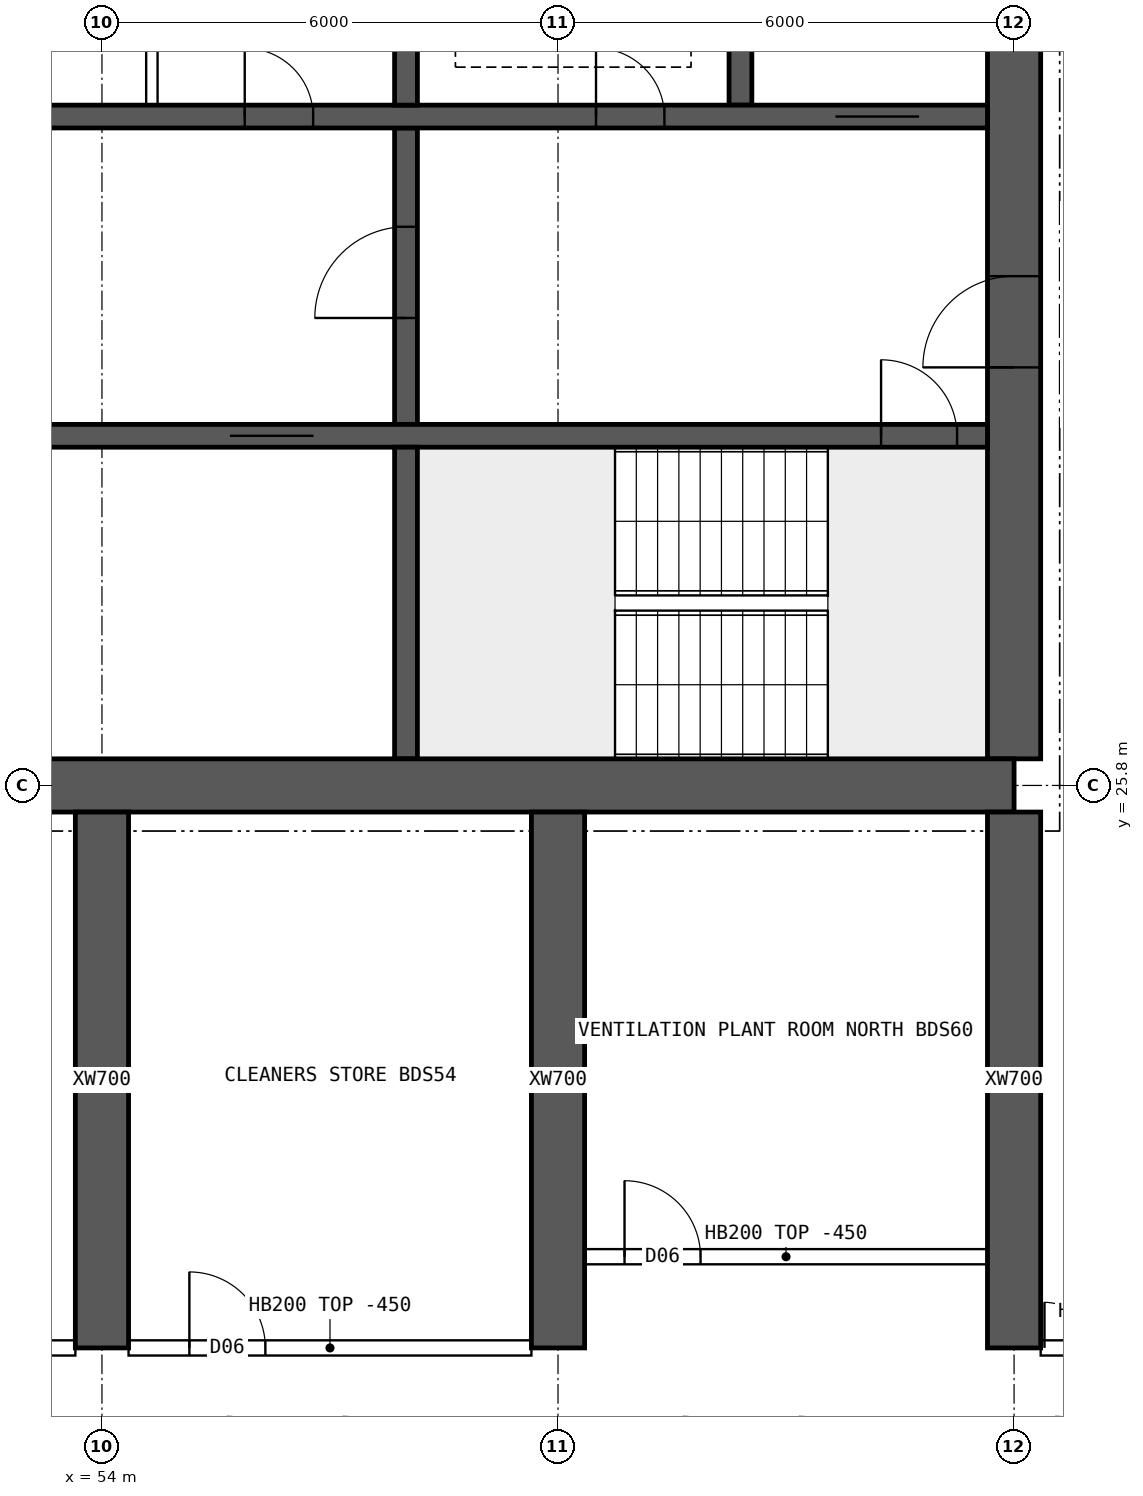
"""IFC4 building model, lengths in metres.
Left out: names, types, materials, properties, quantities, classifications, styles, units other than length and angle.
Written with IfcOpenShell. Run it as: python <this file> out.ifc"""

import sys

from ifc_helpers import new_model, si_unit, direction, frame, frame_2d, origin, place, context, subcontext, project, spatial, rectangle, extrude, element, fill, save


model = new_model("IFC4")
c1 = context("Model", 3, precision=1e-05, world=origin(), true_north=direction((0.0, 1.0)))
c2 = subcontext(c1, "Body", "Model", "MODEL_VIEW")
j1 = project(units=[si_unit("LENGTHUNIT", "METRE"), si_unit("PLANEANGLEUNIT", "RADIAN")], contexts=[c1])
p1 = place(None, origin())
s1 = spatial("IfcSite", under=j1, at=p1, CompositionType="ELEMENT")
p2 = place(p1, origin())
s2 = spatial("IfcBuilding", under=s1, at=p2, CompositionType="ELEMENT")
p3 = place(p2, frame((0.0, 0.0, 242.8)))
s3 = spatial("IfcBuildingStorey", under=s2, at=p3, CompositionType="ELEMENT", Elevation=242.8)
p4 = place(p3, frame((18.0, 25.8, 0.0), z_axis=(0.0, 0.0, 1.0), x_axis=(1.0, 0.0, 0.0)))
e1 = element("IfcWall", 1, at=p4, inside=s3, PredefinedType="SHEAR", context=c2, shape_type="SweptSolid", body=[
    extrude(rectangle(XDim=48.0, YDim=0.7, at=frame_2d((24.0, 0.0))), origin(), (0.0, 0.0, 1.0), 3.75),
])
p5 = place(p3, frame((66.0, 26.15, 0.0), z_axis=(0.0, 0.0, 1.0), x_axis=(0.0, 1.0, 0.0)))
e2 = element("IfcWall", 2, at=p5, inside=s3, PredefinedType="SHEAR", context=c2, shape_type="SweptSolid", body=[
    extrude(rectangle(XDim=11.7, YDim=0.7, at=frame_2d((5.85, 0.0))), origin(), (0.0, 0.0, 1.0), 3.75),
])
p6 = place(p5, frame((5.15, 0.0, 0.0)))
e3 = element("IfcOpeningElement", 3, at=p6, cuts=e2, PredefinedType="OPENING", context=c2, shape_type="SweptSolid", body=[
    extrude(rectangle(XDim=1.2, YDim=2.1, at=frame_2d((0.6, 1.05))), frame((0.0, 0.36, 0.0), z_axis=(0.0, -1.0, 0.0), x_axis=(1.0, 0.0, 0.0)), (0.0, 0.0, 1.0), 0.72),
])
p7 = place(p3, frame((18.35, 30.4, 0.0), z_axis=(0.0, 0.0, 1.0), x_axis=(1.0, 0.0, 0.0)))
e4 = element("IfcWall", 4, at=p7, inside=s3, PredefinedType="SHEAR", context=c2, shape_type="SweptSolid", body=[
    extrude(rectangle(XDim=47.3, YDim=0.3, at=frame_2d((23.65, 0.0))), origin(), (0.0, 0.0, 1.0), 3.75),
])
p8 = place(p7, frame((0.4, 0.0, 0.0)))
e5 = element("IfcOpeningElement", 5, at=p8, cuts=e4, PredefinedType="OPENING", context=c2, shape_type="SweptSolid", body=[
    extrude(rectangle(XDim=1.0, YDim=2.1, at=frame_2d((0.5, 1.05))), frame((0.0, 0.16, 0.0), z_axis=(0.0, -1.0, 0.0), x_axis=(1.0, 0.0, 0.0)), (0.0, 0.0, 1.0), 0.32),
])
p9 = place(p7, frame((45.9, 0.0, 0.0)))
e6 = element("IfcOpeningElement", 6, at=p9, cuts=e4, PredefinedType="OPENING", context=c2, shape_type="SweptSolid", body=[
    extrude(rectangle(XDim=1.0, YDim=2.1, at=frame_2d((0.5, 1.05))), frame((0.0, 0.16, 0.0), z_axis=(0.0, -1.0, 0.0), x_axis=(1.0, 0.0, 0.0)), (0.0, 0.0, 1.0), 0.32),
])
p10 = place(p7, frame((8.4, 0.0, 0.0)))
e7 = element("IfcOpeningElement", 7, at=p10, cuts=e4, PredefinedType="OPENING", context=c2, shape_type="SweptSolid", body=[
    extrude(rectangle(XDim=1.1, YDim=2.1, at=frame_2d((0.55, 1.05))), frame((0.0, 0.16, 0.0), z_axis=(0.0, -1.0, 0.0), x_axis=(1.0, 0.0, 0.0)), (0.0, 0.0, 1.0), 0.32),
])
p11 = place(p7, frame((11.0, 0.0, 0.0)))
e8 = element("IfcOpeningElement", 8, at=p11, cuts=e4, PredefinedType="OPENING", context=c2, shape_type="SweptSolid", body=[
    extrude(rectangle(XDim=1.1, YDim=2.1, at=frame_2d((0.55, 1.05))), frame((0.0, 0.16, 0.0), z_axis=(0.0, -1.0, 0.0), x_axis=(1.0, 0.0, 0.0)), (0.0, 0.0, 1.0), 0.32),
])
p12 = place(p7, frame((13.6, 0.0, 0.0)))
e9 = element("IfcOpeningElement", 9, at=p12, cuts=e4, PredefinedType="OPENING", context=c2, shape_type="SweptSolid", body=[
    extrude(rectangle(XDim=1.1, YDim=2.1, at=frame_2d((0.55, 1.05))), frame((0.0, 0.16, 0.0), z_axis=(0.0, -1.0, 0.0), x_axis=(1.0, 0.0, 0.0)), (0.0, 0.0, 1.0), 0.32),
])
p13 = place(p7, frame((16.2, 0.0, 0.0)))
e10 = element("IfcOpeningElement", 10, at=p13, cuts=e4, PredefinedType="OPENING", context=c2, shape_type="SweptSolid", body=[
    extrude(rectangle(XDim=1.1, YDim=2.1, at=frame_2d((0.55, 1.05))), frame((0.0, 0.16, 0.0), z_axis=(0.0, -1.0, 0.0), x_axis=(1.0, 0.0, 0.0)), (0.0, 0.0, 1.0), 0.32),
])
p14 = place(p7, frame((18.975, 0.0, 0.0)))
e11 = element("IfcOpeningElement", 11, at=p14, cuts=e4, PredefinedType="OPENING", context=c2, shape_type="SweptSolid", body=[
    extrude(rectangle(XDim=0.9, YDim=2.1, at=frame_2d((0.45, 1.05))), frame((0.0, 0.16, 0.0), z_axis=(0.0, -1.0, 0.0), x_axis=(1.0, 0.0, 0.0)), (0.0, 0.0, 1.0), 0.32),
])
p15 = place(p7, frame((24.475, 0.0, 0.0)))
e12 = element("IfcOpeningElement", 12, at=p15, cuts=e4, PredefinedType="OPENING", context=c2, shape_type="SweptSolid", body=[
    extrude(rectangle(XDim=0.9, YDim=2.1, at=frame_2d((0.45, 1.05))), frame((0.0, 0.16, 0.0), z_axis=(0.0, -1.0, 0.0), x_axis=(1.0, 0.0, 0.0)), (0.0, 0.0, 1.0), 0.32),
])
p16 = place(p7, frame((30.267, 0.0, 0.0)))
e13 = element("IfcOpeningElement", 13, at=p16, cuts=e4, PredefinedType="OPENING", context=c2, shape_type="SweptSolid", body=[
    extrude(rectangle(XDim=1.1, YDim=2.1, at=frame_2d((0.55, 1.05))), frame((0.0, 0.16, 0.0), z_axis=(0.0, -1.0, 0.0), x_axis=(1.0, 0.0, 0.0)), (0.0, 0.0, 1.0), 0.32),
])
p17 = place(p7, frame((33.8, 0.0, 0.0)))
e14 = element("IfcOpeningElement", 14, at=p17, cuts=e4, PredefinedType="OPENING", context=c2, shape_type="SweptSolid", body=[
    extrude(rectangle(XDim=1.1, YDim=2.1, at=frame_2d((0.55, 1.05))), frame((0.0, 0.16, 0.0), z_axis=(0.0, -1.0, 0.0), x_axis=(1.0, 0.0, 0.0)), (0.0, 0.0, 1.0), 0.32),
])
p18 = place(p7, frame((37.333, 0.0, 0.0)))
e15 = element("IfcOpeningElement", 15, at=p18, cuts=e4, PredefinedType="OPENING", context=c2, shape_type="SweptSolid", body=[
    extrude(rectangle(XDim=1.1, YDim=2.1, at=frame_2d((0.55, 1.05))), frame((0.0, 0.16, 0.0), z_axis=(0.0, -1.0, 0.0), x_axis=(1.0, 0.0, 0.0)), (0.0, 0.0, 1.0), 0.32),
])
p19 = place(p3, frame((18.35, 34.6, 0.0), z_axis=(0.0, 0.0, 1.0), x_axis=(1.0, 0.0, 0.0)))
e16 = element("IfcWall", 16, at=p19, inside=s3, PredefinedType="SHEAR", context=c2, shape_type="SweptSolid", body=[
    extrude(rectangle(XDim=47.3, YDim=0.3, at=frame_2d((23.65, 0.0))), origin(), (0.0, 0.0, 1.0), 3.75),
])
p20 = place(p19, frame((0.9, 0.0, 0.0)))
e17 = element("IfcOpeningElement", 17, at=p20, cuts=e16, PredefinedType="OPENING", context=c2, shape_type="SweptSolid", body=[
    extrude(rectangle(XDim=1.1, YDim=2.1, at=frame_2d((0.55, 1.05))), frame((0.0, 0.16, 0.0), z_axis=(0.0, -1.0, 0.0), x_axis=(1.0, 0.0, 0.0)), (0.0, 0.0, 1.0), 0.32),
])
p21 = place(p19, frame((45.3, 0.0, 0.0)))
e18 = element("IfcOpeningElement", 18, at=p21, cuts=e16, PredefinedType="OPENING", context=c2, shape_type="SweptSolid", body=[
    extrude(rectangle(XDim=1.1, YDim=2.1, at=frame_2d((0.55, 1.05))), frame((0.0, 0.16, 0.0), z_axis=(0.0, -1.0, 0.0), x_axis=(1.0, 0.0, 0.0)), (0.0, 0.0, 1.0), 0.32),
])
p22 = place(p19, frame((4.25, 0.0, 0.0)))
e19 = element("IfcOpeningElement", 19, at=p22, cuts=e16, PredefinedType="OPENING", context=c2, shape_type="SweptSolid", body=[
    extrude(rectangle(XDim=0.9, YDim=2.1, at=frame_2d((0.45, 1.05))), frame((0.0, 0.16, 0.0), z_axis=(0.0, -1.0, 0.0), x_axis=(1.0, 0.0, 0.0)), (0.0, 0.0, 1.0), 0.32),
])
p23 = place(p19, frame((42.15, 0.0, 0.0)))
e20 = element("IfcOpeningElement", 20, at=p23, cuts=e16, PredefinedType="OPENING", context=c2, shape_type="SweptSolid", body=[
    extrude(rectangle(XDim=0.9, YDim=2.1, at=frame_2d((0.45, 1.05))), frame((0.0, 0.16, 0.0), z_axis=(0.0, -1.0, 0.0), x_axis=(1.0, 0.0, 0.0)), (0.0, 0.0, 1.0), 0.32),
])
p24 = place(p19, frame((9.025, 0.0, 0.0)))
e21 = element("IfcOpeningElement", 21, at=p24, cuts=e16, PredefinedType="OPENING", context=c2, shape_type="SweptSolid", body=[
    extrude(rectangle(XDim=0.9, YDim=2.1, at=frame_2d((0.45, 1.05))), frame((0.0, 0.16, 0.0), z_axis=(0.0, -1.0, 0.0), x_axis=(1.0, 0.0, 0.0)), (0.0, 0.0, 1.0), 0.32),
])
p25 = place(p19, frame((12.999, 0.0, 0.0)))
e22 = element("IfcOpeningElement", 22, at=p25, cuts=e16, PredefinedType="OPENING", context=c2, shape_type="SweptSolid", body=[
    extrude(rectangle(XDim=0.9, YDim=2.1, at=frame_2d((0.45, 1.05))), frame((0.0, 0.16, 0.0), z_axis=(0.0, -1.0, 0.0), x_axis=(1.0, 0.0, 0.0)), (0.0, 0.0, 1.0), 0.32),
])
p26 = place(p19, frame((16.646, 0.0, 0.0)))
e23 = element("IfcOpeningElement", 23, at=p26, cuts=e16, PredefinedType="OPENING", context=c2, shape_type="SweptSolid", body=[
    extrude(rectangle(XDim=0.9, YDim=2.1, at=frame_2d((0.45, 1.05))), frame((0.0, 0.16, 0.0), z_axis=(0.0, -1.0, 0.0), x_axis=(1.0, 0.0, 0.0)), (0.0, 0.0, 1.0), 0.32),
])
p27 = place(p19, frame((20.405, 0.0, 0.0)))
e24 = element("IfcOpeningElement", 24, at=p27, cuts=e16, PredefinedType="OPENING", context=c2, shape_type="SweptSolid", body=[
    extrude(rectangle(XDim=0.9, YDim=2.1, at=frame_2d((0.45, 1.05))), frame((0.0, 0.16, 0.0), z_axis=(0.0, -1.0, 0.0), x_axis=(1.0, 0.0, 0.0)), (0.0, 0.0, 1.0), 0.32),
])
p28 = place(p19, frame((24.811, 0.0, 0.0)))
e25 = element("IfcOpeningElement", 25, at=p28, cuts=e16, PredefinedType="OPENING", context=c2, shape_type="SweptSolid", body=[
    extrude(rectangle(XDim=0.9, YDim=2.1, at=frame_2d((0.45, 1.05))), frame((0.0, 0.16, 0.0), z_axis=(0.0, -1.0, 0.0), x_axis=(1.0, 0.0, 0.0)), (0.0, 0.0, 1.0), 0.32),
])
p29 = place(p19, frame((27.608, 0.0, 0.0)))
e26 = element("IfcOpeningElement", 26, at=p29, cuts=e16, PredefinedType="OPENING", context=c2, shape_type="SweptSolid", body=[
    extrude(rectangle(XDim=0.9, YDim=2.1, at=frame_2d((0.45, 1.05))), frame((0.0, 0.16, 0.0), z_axis=(0.0, -1.0, 0.0), x_axis=(1.0, 0.0, 0.0)), (0.0, 0.0, 1.0), 0.32),
])
p30 = place(p19, frame((29.778, 0.0, 0.0)))
e27 = element("IfcOpeningElement", 27, at=p30, cuts=e16, PredefinedType="OPENING", context=c2, shape_type="SweptSolid", body=[
    extrude(rectangle(XDim=0.9, YDim=2.1, at=frame_2d((0.45, 1.05))), frame((0.0, 0.16, 0.0), z_axis=(0.0, -1.0, 0.0), x_axis=(1.0, 0.0, 0.0)), (0.0, 0.0, 1.0), 0.32),
])
p31 = place(p19, frame((33.577, 0.0, 0.0)))
e28 = element("IfcOpeningElement", 28, at=p31, cuts=e16, PredefinedType="OPENING", context=c2, shape_type="SweptSolid", body=[
    extrude(rectangle(XDim=0.9, YDim=2.1, at=frame_2d((0.45, 1.05))), frame((0.0, 0.16, 0.0), z_axis=(0.0, -1.0, 0.0), x_axis=(1.0, 0.0, 0.0)), (0.0, 0.0, 1.0), 0.32),
])
p32 = place(p19, frame((37.528, 0.0, 0.0)))
e29 = element("IfcOpeningElement", 29, at=p32, cuts=e16, PredefinedType="OPENING", context=c2, shape_type="SweptSolid", body=[
    extrude(rectangle(XDim=0.9, YDim=2.1, at=frame_2d((0.45, 1.05))), frame((0.0, 0.16, 0.0), z_axis=(0.0, -1.0, 0.0), x_axis=(1.0, 0.0, 0.0)), (0.0, 0.0, 1.0), 0.32),
])
p33 = place(p3, frame((58.0, 26.15, 0.0), z_axis=(0.0, 0.0, 1.0), x_axis=(0.0, 1.0, 0.0)))
e30 = element("IfcWall", 30, at=p33, inside=s3, PredefinedType="SHEAR", context=c2, shape_type="SweptSolid", body=[
    extrude(rectangle(XDim=4.1, YDim=0.3, at=frame_2d((2.05, 0.0))), origin(), (0.0, 0.0, 1.0), 3.75),
])
p34 = place(p3, frame((58.0, 30.55, 0.0), z_axis=(0.0, 0.0, 1.0), x_axis=(0.0, 1.0, 0.0)))
e31 = element("IfcWall", 31, at=p34, inside=s3, PredefinedType="SHEAR", context=c2, shape_type="SweptSolid", body=[
    extrude(rectangle(XDim=3.9, YDim=0.3, at=frame_2d((1.95, 0.0))), origin(), (0.0, 0.0, 1.0), 3.75),
])
p35 = place(p34, frame((1.4, 0.0, 0.0)))
e32 = element("IfcOpeningElement", 32, at=p35, cuts=e31, PredefinedType="OPENING", context=c2, shape_type="SweptSolid", body=[
    extrude(rectangle(XDim=1.2, YDim=2.1, at=frame_2d((0.6, 1.05))), frame((0.0, 0.16, 0.0), z_axis=(0.0, -1.0, 0.0), x_axis=(1.0, 0.0, 0.0)), (0.0, 0.0, 1.0), 0.32),
])
for number, where, z_axis, x_axis in (
    (33, (62.4, 34.75, 0.0), (0.0, 0.0, 1.0), (0.0, 1.0, 0.0)),
    (34, (58.0, 34.75, 0.0), (0.0, 0.0, 1.0), (0.0, 1.0, 0.0)),
):
    element("IfcWall", number, at=place(p3, frame(where, z_axis=z_axis, x_axis=x_axis)), inside=s3, PredefinedType="SHEAR", context=c2, shape_type="SweptSolid", body=[
        extrude(rectangle(XDim=3.1, YDim=0.3, at=frame_2d((1.55, 0.0))), origin(), (0.0, 0.0, 1.0), 3.75),
    ])
for number, where, z_axis, x_axis in (
    (35, (54.0, 18.4, 0.0), (0.0, 0.0, 1.0), (0.0, 1.0, 0.0)),
    (36, (60.0, 18.4, 0.0), (0.0, 0.0, 1.0), (0.0, 1.0, 0.0)),
    (37, (66.0, 18.4, 0.0), (0.0, 0.0, 1.0), (0.0, 1.0, 0.0)),
):
    element("IfcWall", number, at=place(p3, frame(where, z_axis=z_axis, x_axis=x_axis)), inside=s3, PredefinedType="SHEAR", context=c2, shape_type="SweptSolid", body=[
        extrude(rectangle(XDim=7.05, YDim=0.7, at=frame_2d((3.525, 0.0))), origin(), (0.0, 0.0, 1.0), 3.75),
    ])
p36 = place(p3, frame((54.657, 34.75, 0.0), z_axis=(0.0, 0.0, 1.0), x_axis=(0.0, 1.0, 0.0)))
e38 = element("IfcWall", 38, at=p36, inside=s3, PredefinedType="SOLIDWALL", context=c2, shape_type="SweptSolid", body=[
    extrude(rectangle(XDim=3.1, YDim=0.15, at=frame_2d((1.55, 0.0))), origin(), (0.0, 0.0, 1.0), 3.3),
])
p37 = place(p3, frame((48.35, 18.4, 0.0), z_axis=(0.0, 0.0, 1.0), x_axis=(1.0, 0.0, 0.0)))
e39 = element("IfcWall", 39, at=p37, inside=s3, PredefinedType="SOLIDWALL", context=c2, shape_type="SweptSolid", body=[
    extrude(rectangle(XDim=5.3, YDim=0.2, at=frame_2d((2.65, 0.0))), origin(), (0.0, 0.0, 1.0), 3.3),
])
p38 = place(p37, frame((0.15, 0.0, 0.0)))
e40 = element("IfcOpeningElement", 40, at=p38, cuts=e39, PredefinedType="OPENING", context=c2, shape_type="SweptSolid", body=[
    extrude(rectangle(XDim=0.9, YDim=2.1, at=frame_2d((0.45, 1.05))), frame((0.0, 0.11, 0.0), z_axis=(0.0, -1.0, 0.0), x_axis=(1.0, 0.0, 0.0)), (0.0, 0.0, 1.0), 0.22),
])
p39 = place(p37, frame((2.35, 0.0, 0.0)))
e41 = element("IfcOpeningElement", 41, at=p39, cuts=e39, PredefinedType="OPENING", context=c2, shape_type="SweptSolid", body=[
    extrude(rectangle(XDim=0.9, YDim=2.1, at=frame_2d((0.45, 1.05))), frame((0.0, 0.11, 0.0), z_axis=(0.0, -1.0, 0.0), x_axis=(1.0, 0.0, 0.0)), (0.0, 0.0, 1.0), 0.22),
])
p40 = place(p3, frame((54.35, 18.4, 0.0), z_axis=(0.0, 0.0, 1.0), x_axis=(1.0, 0.0, 0.0)))
e42 = element("IfcWall", 42, at=p40, inside=s3, PredefinedType="SOLIDWALL", context=c2, shape_type="SweptSolid", body=[
    extrude(rectangle(XDim=5.3, YDim=0.2, at=frame_2d((2.65, 0.0))), origin(), (0.0, 0.0, 1.0), 3.3),
])
p41 = place(p40, frame((0.8, 0.0, 0.0)))
e43 = element("IfcOpeningElement", 43, at=p41, cuts=e42, PredefinedType="OPENING", context=c2, shape_type="SweptSolid", body=[
    extrude(rectangle(XDim=1.0, YDim=2.1, at=frame_2d((0.5, 1.05))), frame((0.0, 0.11, 0.0), z_axis=(0.0, -1.0, 0.0), x_axis=(1.0, 0.0, 0.0)), (0.0, 0.0, 1.0), 0.22),
])
p42 = place(p3, frame((66.35, 18.4, 0.0), z_axis=(0.0, 0.0, 1.0), x_axis=(1.0, 0.0, 0.0)))
e44 = element("IfcWall", 44, at=p42, inside=s3, PredefinedType="SOLIDWALL", context=c2, shape_type="SweptSolid", body=[
    extrude(rectangle(XDim=2.05, YDim=0.2, at=frame_2d((1.025, 0.0))), origin(), (0.0, 0.0, 1.0), 3.3),
])
p43 = place(p42, frame((0.05, 0.0, 0.0)))
e45 = element("IfcOpeningElement", 45, at=p43, cuts=e44, PredefinedType="OPENING", context=c2, shape_type="SweptSolid", body=[
    extrude(rectangle(XDim=1.2, YDim=2.1, at=frame_2d((0.6, 1.05))), frame((0.0, 0.11, 0.0), z_axis=(0.0, -1.0, 0.0), x_axis=(1.0, 0.0, 0.0)), (0.0, 0.0, 1.0), 0.22),
])
p44 = place(p3, frame((60.35, 19.6, 0.0), z_axis=(0.0, 0.0, 1.0), x_axis=(1.0, 0.0, 0.0)))
e46 = element("IfcWall", 46, at=p44, inside=s3, PredefinedType="SOLIDWALL", context=c2, shape_type="SweptSolid", body=[
    extrude(rectangle(XDim=5.3, YDim=0.2, at=frame_2d((2.65, 0.0))), origin(), (0.0, 0.0, 1.0), 3.3),
])
p45 = place(p44, frame((0.525, 0.0, 0.0)))
e47 = element("IfcOpeningElement", 47, at=p45, cuts=e46, PredefinedType="OPENING", context=c2, shape_type="SweptSolid", body=[
    extrude(rectangle(XDim=1.0, YDim=2.1, at=frame_2d((0.5, 1.05))), frame((0.0, 0.11, 0.0), z_axis=(0.0, -1.0, 0.0), x_axis=(1.0, 0.0, 0.0)), (0.0, 0.0, 1.0), 0.22),
])
p46 = place(p6, origin())
e48 = element("IfcDoor", 48, at=p46, inside=s3, OperationType="SINGLE_SWING_LEFT", PredefinedType="DOOR", context=c2, shape_type="SweptSolid", body=[
    extrude(rectangle(XDim=1.2, YDim=2.1, at=frame_2d((0.6, 1.05))), frame((0.0, 0.025, 0.0), z_axis=(0.0, -1.0, 0.0), x_axis=(1.0, 0.0, 0.0)), (0.0, 0.0, 1.0), 0.05),
])
fill(e3, e48)
p47 = place(p9, origin())
e49 = element("IfcDoor", 49, at=p47, inside=s3, OperationType="SINGLE_SWING_LEFT", PredefinedType="DOOR", context=c2, shape_type="SweptSolid", body=[
    extrude(rectangle(XDim=1.0, YDim=2.1, at=frame_2d((0.5, 1.05))), frame((0.0, 0.025, 0.0), z_axis=(0.0, -1.0, 0.0), x_axis=(1.0, 0.0, 0.0)), (0.0, 0.0, 1.0), 0.05),
])
fill(e6, e49)
p48 = place(p21, origin())
e50 = element("IfcDoor", 50, at=p48, inside=s3, OperationType="DOUBLE_DOOR_SLIDING", PredefinedType="DOOR", context=c2, shape_type="SweptSolid", body=[
    extrude(rectangle(XDim=1.1, YDim=2.1, at=frame_2d((0.55, 1.05))), frame((0.0, 0.025, 0.0), z_axis=(0.0, -1.0, 0.0), x_axis=(1.0, 0.0, 0.0)), (0.0, 0.0, 1.0), 0.05),
])
fill(e18, e50)
p49 = place(p23, origin())
e51 = element("IfcDoor", 51, at=p49, inside=s3, OperationType="SINGLE_SWING_LEFT", PredefinedType="DOOR", context=c2, shape_type="SweptSolid", body=[
    extrude(rectangle(XDim=0.9, YDim=2.1, at=frame_2d((0.45, 1.05))), frame((0.0, 0.025, 0.0), z_axis=(0.0, -1.0, 0.0), x_axis=(1.0, 0.0, 0.0)), (0.0, 0.0, 1.0), 0.05),
])
fill(e20, e51)
p50 = place(p35, origin())
e52 = element("IfcDoor", 52, at=p50, inside=s3, OperationType="SINGLE_SWING_LEFT", PredefinedType="DOOR", context=c2, shape_type="SweptSolid", body=[
    extrude(rectangle(XDim=1.2, YDim=2.1, at=frame_2d((0.6, 1.05))), frame((0.0, 0.025, 0.0), z_axis=(0.0, -1.0, 0.0), x_axis=(1.0, 0.0, 0.0)), (0.0, 0.0, 1.0), 0.05),
])
fill(e32, e52)
p51 = place(p32, origin())
e53 = element("IfcDoor", 53, at=p51, inside=s3, OperationType="SINGLE_SWING_LEFT", PredefinedType="DOOR", context=c2, shape_type="SweptSolid", body=[
    extrude(rectangle(XDim=0.9, YDim=2.1, at=frame_2d((0.45, 1.05))), frame((0.0, 0.025, 0.0), z_axis=(0.0, -1.0, 0.0), x_axis=(1.0, 0.0, 0.0)), (0.0, 0.0, 1.0), 0.05),
])
fill(e29, e53)
p52 = place(p18, origin())
e54 = element("IfcDoor", 54, at=p52, inside=s3, OperationType="DOUBLE_DOOR_SLIDING", PredefinedType="DOOR", context=c2, shape_type="SweptSolid", body=[
    extrude(rectangle(XDim=1.1, YDim=2.1, at=frame_2d((0.55, 1.05))), frame((0.0, 0.025, 0.0), z_axis=(0.0, -1.0, 0.0), x_axis=(1.0, 0.0, 0.0)), (0.0, 0.0, 1.0), 0.05),
])
fill(e15, e54)
p53 = place(p43, origin())
e55 = element("IfcDoor", 55, at=p53, inside=s3, OperationType="DOUBLE_DOOR_SINGLE_SWING", PredefinedType="DOOR", context=c2, shape_type="SweptSolid", body=[
    extrude(rectangle(XDim=1.2, YDim=2.1, at=frame_2d((0.6, 1.05))), frame((0.0, 0.025, 0.0), z_axis=(0.0, -1.0, 0.0), x_axis=(1.0, 0.0, 0.0)), (0.0, 0.0, 1.0), 0.05),
])
fill(e45, e55)
p54 = place(p41, origin())
e56 = element("IfcDoor", 56, at=p54, inside=s3, OperationType="SINGLE_SWING_LEFT", PredefinedType="DOOR", context=c2, shape_type="SweptSolid", body=[
    extrude(rectangle(XDim=1.0, YDim=2.1, at=frame_2d((0.5, 1.05))), frame((0.0, 0.025, 0.0), z_axis=(0.0, -1.0, 0.0), x_axis=(1.0, 0.0, 0.0)), (0.0, 0.0, 1.0), 0.05),
])
fill(e43, e56)
p55 = place(p45, origin())
e57 = element("IfcDoor", 57, at=p55, inside=s3, OperationType="SINGLE_SWING_LEFT", PredefinedType="DOOR", context=c2, shape_type="SweptSolid", body=[
    extrude(rectangle(XDim=1.0, YDim=2.1, at=frame_2d((0.5, 1.05))), frame((0.0, 0.025, 0.0), z_axis=(0.0, -1.0, 0.0), x_axis=(1.0, 0.0, 0.0)), (0.0, 0.0, 1.0), 0.05),
])
fill(e47, e57)
save(model, sys.argv[1])
